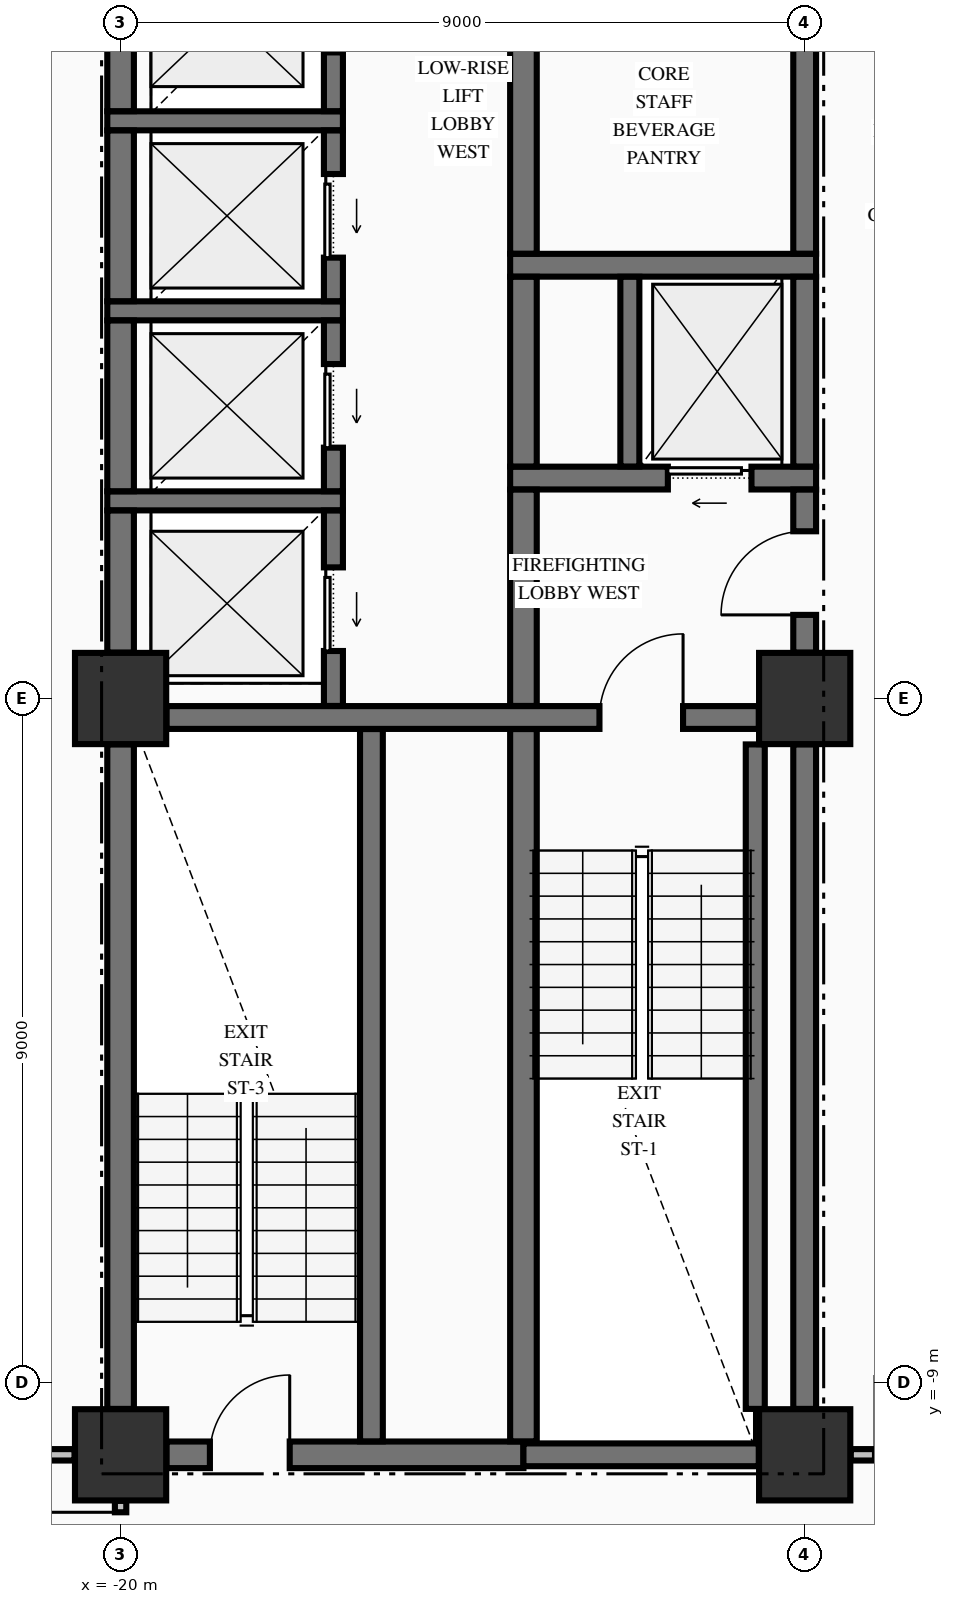
"""IFC4 building model, lengths in metres.
Left out: names, types, materials, properties, quantities, classifications, styles, units other than length and angle.
Written with IfcOpenShell. Run it as: python <this file> out.ifc"""

import sys

from ifc_helpers import new_model, si_unit, direction, frame, frame_2d, origin, origin_2d, place, context, subcontext, project, spatial, rectangle, extrude, element, fill, save


model = new_model("IFC4")
c1 = context("Model", 3, precision=1e-05, world=origin(), true_north=direction((0.0, 1.0)))
c2 = subcontext(c1, "Body", "Model", "MODEL_VIEW")
j1 = project(units=[si_unit("LENGTHUNIT", "METRE"), si_unit("PLANEANGLEUNIT", "RADIAN")], contexts=[c1])
p1 = place(None, origin())
s1 = spatial("IfcSite", under=j1, at=p1, CompositionType="ELEMENT")
p2 = place(p1, origin())
s2 = spatial("IfcBuilding", under=s1, at=p2, CompositionType="ELEMENT")
p3 = place(p2, frame((0.0, 0.0, 60.76)))
s3 = spatial("IfcBuildingStorey", under=s2, at=p3, CompositionType="ELEMENT", Elevation=60.76)
for number, where, z_axis, x_axis in (
    (1, (-20.0, -9.95, -0.3), (0.0, 0.0, 1.0), (1.0, 0.0, 0.0)),
    (2, (-11.0, -9.95, -0.3), (0.0, 0.0, 1.0), (1.0, 0.0, 0.0)),
    (3, (-11.0, 0.0, -0.3), (0.0, 0.0, 1.0), (1.0, 0.0, 0.0)),
    (4, (-20.0, 0.0, -0.3), (0.0, 0.0, 1.0), (1.0, 0.0, 0.0)),
):
    element("IfcColumn", number, at=place(p3, frame(where, z_axis=z_axis, x_axis=x_axis)), inside=s3, PredefinedType="COLUMN", context=c2, shape_type="SweptSolid", body=[
        extrude(rectangle(XDim=1.2, YDim=1.2, at=origin_2d()), origin(), (0.0, 0.0, 1.0), 3.62),
    ])
p4 = place(p3, frame((-19.396, -9.95, 0.0), z_axis=(0.0, 0.0, 1.0), x_axis=(1.0, 0.0, 0.0)))
e5 = element("IfcWall", 5, at=p4, inside=s3, PredefinedType="SHEAR", context=c2, shape_type="SweptSolid", body=[
    extrude(rectangle(XDim=4.696, YDim=0.35, at=frame_2d((2.348, 0.0))), origin(), (0.0, 0.0, 1.0), 3.32),
])
p5 = place(p4, frame((0.571, 0.0, 0.0)))
e6 = element("IfcOpeningElement", 6, at=p5, cuts=e5, PredefinedType="OPENING", context=c2, shape_type="SweptSolid", body=[
    extrude(rectangle(XDim=1.05, YDim=2.15, at=frame_2d((0.525, 1.075))), frame((0.0, 0.185, 0.0), z_axis=(0.0, -1.0, 0.0), x_axis=(1.0, 0.0, 0.0)), (0.0, 0.0, 1.0), 0.37),
])
p6 = place(p3, frame((-14.7, -9.95, 0.0), z_axis=(0.0, 0.0, 1.0), x_axis=(1.0, 0.0, 0.0)))
e7 = element("IfcWall", 7, at=p6, inside=s3, PredefinedType="SHEAR", context=c2, shape_type="SweptSolid", body=[
    extrude(rectangle(XDim=3.096, YDim=0.3, at=frame_2d((1.548, 0.0))), origin(), (0.0, 0.0, 1.0), 3.32),
])
p7 = place(p3, frame((-19.396, -0.25, 0.0), z_axis=(0.0, 0.0, 1.0), x_axis=(1.0, 0.0, 0.0)))
e8 = element("IfcWall", 8, at=p7, inside=s3, PredefinedType="SHEAR", context=c2, shape_type="SweptSolid", body=[
    extrude(rectangle(XDim=7.792, YDim=0.3, at=frame_2d((3.896, 0.0))), origin(), (0.0, 0.0, 1.0), 3.32),
])
p8 = place(p7, frame((5.696, 0.0, 0.0)))
e9 = element("IfcOpeningElement", 9, at=p8, cuts=e8, PredefinedType="OPENING", context=c2, shape_type="SweptSolid", body=[
    extrude(rectangle(XDim=1.1, YDim=2.15, at=frame_2d((0.55, 1.075))), frame((0.0, 0.16, 0.0), z_axis=(0.0, -1.0, 0.0), x_axis=(1.0, 0.0, 0.0)), (0.0, 0.0, 1.0), 0.32),
])
p9 = place(p3, frame((-20.175, 2.6, 0.0), z_axis=(0.0, 0.0, 1.0), x_axis=(1.0, 0.0, 0.0)))
e10 = element("IfcWall", 10, at=p9, inside=s3, PredefinedType="SOLIDWALL", context=c2, shape_type="SweptSolid", body=[
    extrude(rectangle(XDim=3.1, YDim=0.25, at=frame_2d((1.55, 0.0))), origin(), (0.0, 0.0, 1.0), 3.32),
])
p10 = place(p3, frame((-14.875, 2.9, 0.0), z_axis=(0.0, 0.0, 1.0), x_axis=(1.0, 0.0, 0.0)))
e11 = element("IfcWall", 11, at=p10, inside=s3, PredefinedType="SHEAR", context=c2, shape_type="SweptSolid", body=[
    extrude(rectangle(XDim=4.025, YDim=0.3, at=frame_2d((2.012, 0.0))), origin(), (0.0, 0.0, 1.0), 3.32),
])
p11 = place(p10, frame((2.075, 0.0, 0.0)))
e12 = element("IfcOpeningElement", 12, at=p11, cuts=e11, PredefinedType="OPENING", context=c2, shape_type="SweptSolid", body=[
    extrude(rectangle(XDim=1.1, YDim=2.2, at=frame_2d((0.55, 1.1))), frame((0.0, 0.16, 0.0), z_axis=(0.0, -1.0, 0.0), x_axis=(1.0, 0.0, 0.0)), (0.0, 0.0, 1.0), 0.32),
])
p12 = place(p3, frame((-20.175, 5.1, 0.0), z_axis=(0.0, 0.0, 1.0), x_axis=(1.0, 0.0, 0.0)))
e13 = element("IfcWall", 13, at=p12, inside=s3, PredefinedType="SOLIDWALL", context=c2, shape_type="SweptSolid", body=[
    extrude(rectangle(XDim=3.1, YDim=0.25, at=frame_2d((1.55, 0.0))), origin(), (0.0, 0.0, 1.0), 3.32),
])
p13 = place(p3, frame((-14.875, 5.7, 0.0), z_axis=(0.0, 0.0, 1.0), x_axis=(1.0, 0.0, 0.0)))
e14 = element("IfcWall", 14, at=p13, inside=s3, PredefinedType="SHEAR", context=c2, shape_type="SweptSolid", body=[
    extrude(rectangle(XDim=4.025, YDim=0.3, at=frame_2d((2.012, 0.0))), origin(), (0.0, 0.0, 1.0), 3.32),
])
p14 = place(p3, frame((-20.175, 7.6, 0.0), z_axis=(0.0, 0.0, 1.0), x_axis=(1.0, 0.0, 0.0)))
e15 = element("IfcWall", 15, at=p14, inside=s3, PredefinedType="SOLIDWALL", context=c2, shape_type="SweptSolid", body=[
    extrude(rectangle(XDim=3.1, YDim=0.25, at=frame_2d((1.55, 0.0))), origin(), (0.0, 0.0, 1.0), 3.32),
])
p15 = place(p3, frame((-28.835, -9.95, 0.0), z_axis=(0.0, 0.0, 1.0), x_axis=(1.0, 0.0, 0.0)))
e16 = element("IfcWall", 16, at=p15, inside=s3, PredefinedType="PARTITIONING", context=c2, shape_type="SweptSolid", body=[
    extrude(rectangle(XDim=8.229, YDim=0.15, at=frame_2d((4.115, 0.0))), origin(), (0.0, 0.0, 1.0), 3.32),
])
p16 = place(p15, frame((3.835, 0.0, 0.0)))
e17 = element("IfcOpeningElement", 17, at=p16, cuts=e16, PredefinedType="OPENING", context=c2, shape_type="SweptSolid", body=[
    extrude(rectangle(XDim=1.0, YDim=2.15, at=frame_2d((0.5, 1.075))), frame((0.0, 0.085, 0.0), z_axis=(0.0, -1.0, 0.0), x_axis=(1.0, 0.0, 0.0)), (0.0, 0.0, 1.0), 0.17),
])
p17 = place(p3, frame((-10.394, -9.95, 0.0), z_axis=(0.0, 0.0, 1.0), x_axis=(1.0, 0.0, 0.0)))
e18 = element("IfcWall", 18, at=p17, inside=s3, PredefinedType="PARTITIONING", context=c2, shape_type="SweptSolid", body=[
    extrude(rectangle(XDim=20.788, YDim=0.15, at=frame_2d((10.394, 0.0))), origin(), (0.0, 0.0, 1.0), 3.32),
])
p18 = place(p17, frame((0.319, 0.0, 0.0)))
e19 = element("IfcOpeningElement", 19, at=p18, cuts=e18, PredefinedType="OPENING", context=c2, shape_type="SweptSolid", body=[
    extrude(rectangle(XDim=1.05, YDim=2.15, at=frame_2d((0.525, 1.075))), frame((0.0, 0.085, 0.0), z_axis=(0.0, -1.0, 0.0), x_axis=(1.0, 0.0, 0.0)), (0.0, 0.0, 1.0), 0.17),
])
p19 = place(p17, frame((19.419, 0.0, 0.0)))
e20 = element("IfcOpeningElement", 20, at=p19, cuts=e18, PredefinedType="OPENING", context=c2, shape_type="SweptSolid", body=[
    extrude(rectangle(XDim=1.05, YDim=2.15, at=frame_2d((0.525, 1.075))), frame((0.0, 0.085, 0.0), z_axis=(0.0, -1.0, 0.0), x_axis=(1.0, 0.0, 0.0)), (0.0, 0.0, 1.0), 0.17),
])
p20 = place(p17, frame((13.369, 0.0, 0.0)))
e21 = element("IfcOpeningElement", 21, at=p20, cuts=e18, PredefinedType="OPENING", context=c2, shape_type="SweptSolid", body=[
    extrude(rectangle(XDim=0.95, YDim=2.15, at=frame_2d((0.475, 1.075))), frame((0.0, 0.085, 0.0), z_axis=(0.0, -1.0, 0.0), x_axis=(1.0, 0.0, 0.0)), (0.0, 0.0, 1.0), 0.17),
])
p21 = place(p3, frame((-20.0, -9.346, 0.0), z_axis=(0.0, 0.0, 1.0), x_axis=(0.0, 1.0, 0.0)))
e22 = element("IfcWall", 22, at=p21, inside=s3, PredefinedType="SHEAR", context=c2, shape_type="SweptSolid", body=[
    extrude(rectangle(XDim=8.742, YDim=0.35, at=frame_2d((4.371, 0.0))), origin(), (0.0, 0.0, 1.0), 3.32),
])
p22 = place(p3, frame((-20.0, 0.604, 0.0), z_axis=(0.0, 0.0, 1.0), x_axis=(0.0, 1.0, 0.0)))
e23 = element("IfcWall", 23, at=p22, inside=s3, PredefinedType="SHEAR", context=c2, shape_type="SweptSolid", body=[
    extrude(rectangle(XDim=1.869, YDim=0.35, at=frame_2d((0.935, 0.0))), origin(), (0.0, 0.0, 1.0), 3.32),
])
for number, where, z_axis, x_axis in (
    (24, (-20.0, 2.727, 0.0), (0.0, 0.0, 1.0), (0.0, 1.0, 0.0)),
    (25, (-20.0, 5.227, 0.0), (0.0, 0.0, 1.0), (0.0, 1.0, 0.0)),
):
    element("IfcWall", number, at=place(p3, frame(where, z_axis=z_axis, x_axis=x_axis)), inside=s3, PredefinedType="SHEAR", context=c2, shape_type="SweptSolid", body=[
        extrude(rectangle(XDim=2.246, YDim=0.35, at=frame_2d((1.123, 0.0))), origin(), (0.0, 0.0, 1.0), 3.32),
    ])
p23 = place(p3, frame((-20.0, 7.727, 0.0), z_axis=(0.0, 0.0, 1.0), x_axis=(0.0, 1.0, 0.0)))
e26 = element("IfcWall", 26, at=p23, inside=s3, PredefinedType="SHEAR", context=c2, shape_type="SweptSolid", body=[
    extrude(rectangle(XDim=2.169, YDim=0.35, at=frame_2d((1.084, 0.0))), origin(), (0.0, 0.0, 1.0), 3.32),
])
p24 = place(p3, frame((-17.2, -0.098, 0.0), z_axis=(0.0, 0.0, 1.0), x_axis=(0.0, 1.0, 0.0)))
e27 = element("IfcWall", 27, at=p24, inside=s3, PredefinedType="SOLIDWALL", context=c2, shape_type="SweptSolid", body=[
    extrude(rectangle(XDim=2.571, YDim=0.25, at=frame_2d((1.285, 0.0))), origin(), (0.0, 0.0, 1.0), 3.32),
])
p25 = place(p24, frame((0.723, 0.0, 0.0)))
e28 = element("IfcOpeningElement", 28, at=p25, cuts=e27, PredefinedType="OPENING", context=c2, shape_type="SweptSolid", body=[
    extrude(rectangle(XDim=1.1, YDim=2.2, at=frame_2d((0.55, 1.1))), frame((0.0, 0.135, 0.0), z_axis=(0.0, -1.0, 0.0), x_axis=(1.0, 0.0, 0.0)), (0.0, 0.0, 1.0), 0.27),
])
p26 = place(p3, frame((-17.2, 2.727, 0.0), z_axis=(0.0, 0.0, 1.0), x_axis=(0.0, 1.0, 0.0)))
e29 = element("IfcWall", 29, at=p26, inside=s3, PredefinedType="SOLIDWALL", context=c2, shape_type="SweptSolid", body=[
    extrude(rectangle(XDim=2.246, YDim=0.25, at=frame_2d((1.123, 0.0))), origin(), (0.0, 0.0, 1.0), 3.32),
])
p27 = place(p26, frame((0.573, 0.0, 0.0)))
e30 = element("IfcOpeningElement", 30, at=p27, cuts=e29, PredefinedType="OPENING", context=c2, shape_type="SweptSolid", body=[
    extrude(rectangle(XDim=1.1, YDim=2.2, at=frame_2d((0.55, 1.1))), frame((0.0, 0.135, 0.0), z_axis=(0.0, -1.0, 0.0), x_axis=(1.0, 0.0, 0.0)), (0.0, 0.0, 1.0), 0.27),
])
p28 = place(p3, frame((-17.2, 5.227, 0.0), z_axis=(0.0, 0.0, 1.0), x_axis=(0.0, 1.0, 0.0)))
e31 = element("IfcWall", 31, at=p28, inside=s3, PredefinedType="SOLIDWALL", context=c2, shape_type="SweptSolid", body=[
    extrude(rectangle(XDim=2.246, YDim=0.25, at=frame_2d((1.123, 0.0))), origin(), (0.0, 0.0, 1.0), 3.32),
])
p29 = place(p28, frame((0.573, 0.0, 0.0)))
e32 = element("IfcOpeningElement", 32, at=p29, cuts=e31, PredefinedType="OPENING", context=c2, shape_type="SweptSolid", body=[
    extrude(rectangle(XDim=1.1, YDim=2.2, at=frame_2d((0.55, 1.1))), frame((0.0, 0.135, 0.0), z_axis=(0.0, -1.0, 0.0), x_axis=(1.0, 0.0, 0.0)), (0.0, 0.0, 1.0), 0.27),
])
p30 = place(p3, frame((-17.2, 7.727, 0.0), z_axis=(0.0, 0.0, 1.0), x_axis=(0.0, 1.0, 0.0)))
e33 = element("IfcWall", 33, at=p30, inside=s3, PredefinedType="SOLIDWALL", context=c2, shape_type="SweptSolid", body=[
    extrude(rectangle(XDim=2.596, YDim=0.25, at=frame_2d((1.298, 0.0))), origin(), (0.0, 0.0, 1.0), 3.32),
])
p31 = place(p30, frame((0.773, 0.0, 0.0)))
e34 = element("IfcOpeningElement", 34, at=p31, cuts=e33, PredefinedType="OPENING", context=c2, shape_type="SweptSolid", body=[
    extrude(rectangle(XDim=1.1, YDim=2.2, at=frame_2d((0.55, 1.1))), frame((0.0, 0.135, 0.0), z_axis=(0.0, -1.0, 0.0), x_axis=(1.0, 0.0, 0.0)), (0.0, 0.0, 1.0), 0.27),
])
p32 = place(p3, frame((-16.7, -9.773, 0.0), z_axis=(0.0, 0.0, 1.0), x_axis=(0.0, 1.0, 0.0)))
e35 = element("IfcWall", 35, at=p32, inside=s3, PredefinedType="SHEAR", context=c2, shape_type="SweptSolid", body=[
    extrude(rectangle(XDim=9.371, YDim=0.3, at=frame_2d((4.686, 0.0))), origin(), (0.0, 0.0, 1.0), 3.32),
])
p33 = place(p3, frame((-14.7, -9.773, 0.0), z_axis=(0.0, 0.0, 1.0), x_axis=(0.0, 1.0, 0.0)))
e36 = element("IfcWall", 36, at=p33, inside=s3, PredefinedType="SHEAR", context=c2, shape_type="SweptSolid", body=[
    extrude(rectangle(XDim=9.371, YDim=0.35, at=frame_2d((4.686, 0.0))), origin(), (0.0, 0.0, 1.0), 3.32),
])
p34 = place(p3, frame((-14.7, -0.098, 0.0), z_axis=(0.0, 0.0, 1.0), x_axis=(0.0, 1.0, 0.0)))
e37 = element("IfcWall", 37, at=p34, inside=s3, PredefinedType="SHEAR", context=c2, shape_type="SweptSolid", body=[
    extrude(rectangle(XDim=2.846, YDim=0.35, at=frame_2d((1.423, 0.0))), origin(), (0.0, 0.0, 1.0), 3.32),
])
p35 = place(p3, frame((-14.7, 3.052, 0.0), z_axis=(0.0, 0.0, 1.0), x_axis=(0.0, 1.0, 0.0)))
e38 = element("IfcWall", 38, at=p35, inside=s3, PredefinedType="SHEAR", context=c2, shape_type="SweptSolid", body=[
    extrude(rectangle(XDim=2.496, YDim=0.35, at=frame_2d((1.248, 0.0))), origin(), (0.0, 0.0, 1.0), 3.32),
])
p36 = place(p3, frame((-14.7, 5.852, 0.0), z_axis=(0.0, 0.0, 1.0), x_axis=(0.0, 1.0, 0.0)))
e39 = element("IfcWall", 39, at=p36, inside=s3, PredefinedType="SHEAR", context=c2, shape_type="SweptSolid", body=[
    extrude(rectangle(XDim=4.471, YDim=0.35, at=frame_2d((2.235, 0.0))), origin(), (0.0, 0.0, 1.0), 3.32),
])
p37 = place(p3, frame((-13.3, 3.052, 0.0), z_axis=(0.0, 0.0, 1.0), x_axis=(0.0, 1.0, 0.0)))
e40 = element("IfcWall", 40, at=p37, inside=s3, PredefinedType="SOLIDWALL", context=c2, shape_type="SweptSolid", body=[
    extrude(rectangle(XDim=2.496, YDim=0.25, at=frame_2d((1.248, 0.0))), origin(), (0.0, 0.0, 1.0), 3.32),
])
p38 = place(p3, frame((-11.65, -9.346, 0.0), z_axis=(0.0, 0.0, 1.0), x_axis=(0.0, 1.0, 0.0)))
e41 = element("IfcWall", 41, at=p38, inside=s3, PredefinedType="SOLIDWALL", context=c2, shape_type="SweptSolid", body=[
    extrude(rectangle(XDim=8.742, YDim=0.25, at=frame_2d((4.371, 0.0))), origin(), (0.0, 0.0, 1.0), 3.32),
])
p39 = place(p3, frame((-11.0, -9.346, 0.0), z_axis=(0.0, 0.0, 1.0), x_axis=(0.0, 1.0, 0.0)))
e42 = element("IfcWall", 42, at=p39, inside=s3, PredefinedType="SHEAR", context=c2, shape_type="SweptSolid", body=[
    extrude(rectangle(XDim=8.742, YDim=0.3, at=frame_2d((4.371, 0.0))), origin(), (0.0, 0.0, 1.0), 3.32),
])
p40 = place(p3, frame((-11.0, 0.604, 0.0), z_axis=(0.0, 0.0, 1.0), x_axis=(0.0, 1.0, 0.0)))
e43 = element("IfcWall", 43, at=p40, inside=s3, PredefinedType="SHEAR", context=c2, shape_type="SweptSolid", body=[
    extrude(rectangle(XDim=2.144, YDim=0.3, at=frame_2d((1.072, 0.0))), origin(), (0.0, 0.0, 1.0), 3.32),
])
p41 = place(p40, frame((0.496, 0.0, 0.0)))
e44 = element("IfcOpeningElement", 44, at=p41, cuts=e43, PredefinedType="OPENING", context=c2, shape_type="SweptSolid", body=[
    extrude(rectangle(XDim=1.1, YDim=2.15, at=frame_2d((0.55, 1.075))), frame((0.0, 0.16, 0.0), z_axis=(0.0, -1.0, 0.0), x_axis=(1.0, 0.0, 0.0)), (0.0, 0.0, 1.0), 0.32),
])
p42 = place(p3, frame((-11.0, 3.052, 0.0), z_axis=(0.0, 0.0, 1.0), x_axis=(0.0, 1.0, 0.0)))
e45 = element("IfcWall", 45, at=p42, inside=s3, PredefinedType="SHEAR", context=c2, shape_type="SweptSolid", body=[
    extrude(rectangle(XDim=2.496, YDim=0.3, at=frame_2d((1.248, 0.0))), origin(), (0.0, 0.0, 1.0), 3.32),
])
p43 = place(p3, frame((-11.0, 5.852, 0.0), z_axis=(0.0, 0.0, 1.0), x_axis=(0.0, 1.0, 0.0)))
e46 = element("IfcWall", 46, at=p43, inside=s3, PredefinedType="SHEAR", context=c2, shape_type="SweptSolid", body=[
    extrude(rectangle(XDim=4.044, YDim=0.3, at=frame_2d((2.022, 0.0))), origin(), (0.0, 0.0, 1.0), 3.32),
])
p44 = place(p3, frame((-20.0, -12.122, 0.0), z_axis=(0.0, 0.0, 1.0), x_axis=(0.0, 1.0, 0.0)))
e47 = element("IfcWall", 47, at=p44, inside=s3, PredefinedType="PARTITIONING", context=c2, shape_type="SweptSolid", body=[
    extrude(rectangle(XDim=1.566, YDim=0.15, at=frame_2d((0.783, 0.0))), origin(), (0.0, 0.0, 1.0), 2.66),
])
p45 = place(p44, frame((0.466, 0.0, 0.0)))
e48 = element("IfcOpeningElement", 48, at=p45, cuts=e47, PredefinedType="OPENING", context=c2, shape_type="SweptSolid", body=[
    extrude(rectangle(XDim=0.95, YDim=2.15, at=frame_2d((0.475, 1.075))), frame((0.0, 0.085, 0.0), z_axis=(0.0, -1.0, 0.0), x_axis=(1.0, 0.0, 0.0)), (0.0, 0.0, 1.0), 0.17),
])
p46 = place(p8, origin())
e49 = element("IfcDoor", 49, at=p46, inside=s3, OperationType="SINGLE_SWING_RIGHT", PredefinedType="DOOR", context=c2, shape_type="SweptSolid", body=[
    extrude(rectangle(XDim=1.1, YDim=2.15, at=frame_2d((0.55, 1.075))), frame((0.0, 0.025, 0.0), z_axis=(0.0, -1.0, 0.0), x_axis=(1.0, 0.0, 0.0)), (0.0, 0.0, 1.0), 0.05),
])
fill(e9, e49)
p47 = place(p41, origin())
e50 = element("IfcDoor", 50, at=p47, inside=s3, OperationType="SINGLE_SWING_LEFT", PredefinedType="DOOR", context=c2, shape_type="SweptSolid", body=[
    extrude(rectangle(XDim=1.1, YDim=2.15, at=frame_2d((0.55, 1.075))), frame((0.0, 0.025, 0.0), z_axis=(0.0, -1.0, 0.0), x_axis=(1.0, 0.0, 0.0)), (0.0, 0.0, 1.0), 0.05),
])
fill(e44, e50)
p48 = place(p11, origin())
e51 = element("IfcDoor", 51, at=p48, inside=s3, OperationType="SLIDING_TO_LEFT", PredefinedType="DOOR", context=c2, shape_type="SweptSolid", body=[
    extrude(rectangle(XDim=1.1, YDim=2.2, at=frame_2d((0.55, 1.1))), frame((0.0, 0.025, 0.0), z_axis=(0.0, -1.0, 0.0), x_axis=(1.0, 0.0, 0.0)), (0.0, 0.0, 1.0), 0.05),
])
fill(e12, e51)
p49 = place(p5, origin())
e52 = element("IfcDoor", 52, at=p49, inside=s3, OperationType="SINGLE_SWING_RIGHT", PredefinedType="DOOR", context=c2, shape_type="SweptSolid", body=[
    extrude(rectangle(XDim=1.05, YDim=2.15, at=frame_2d((0.525, 1.075))), frame((0.0, 0.025, 0.0), z_axis=(0.0, -1.0, 0.0), x_axis=(1.0, 0.0, 0.0)), (0.0, 0.0, 1.0), 0.05),
])
fill(e6, e52)
p50 = place(p25, origin())
e53 = element("IfcDoor", 53, at=p50, inside=s3, OperationType="SLIDING_TO_LEFT", PredefinedType="DOOR", context=c2, shape_type="SweptSolid", body=[
    extrude(rectangle(XDim=1.1, YDim=2.2, at=frame_2d((0.55, 1.1))), frame((0.0, 0.025, 0.0), z_axis=(0.0, -1.0, 0.0), x_axis=(1.0, 0.0, 0.0)), (0.0, 0.0, 1.0), 0.05),
])
fill(e28, e53)
p51 = place(p27, origin())
e54 = element("IfcDoor", 54, at=p51, inside=s3, OperationType="SLIDING_TO_LEFT", PredefinedType="DOOR", context=c2, shape_type="SweptSolid", body=[
    extrude(rectangle(XDim=1.1, YDim=2.2, at=frame_2d((0.55, 1.1))), frame((0.0, 0.025, 0.0), z_axis=(0.0, -1.0, 0.0), x_axis=(1.0, 0.0, 0.0)), (0.0, 0.0, 1.0), 0.05),
])
fill(e30, e54)
p52 = place(p29, origin())
e55 = element("IfcDoor", 55, at=p52, inside=s3, OperationType="SLIDING_TO_LEFT", PredefinedType="DOOR", context=c2, shape_type="SweptSolid", body=[
    extrude(rectangle(XDim=1.1, YDim=2.2, at=frame_2d((0.55, 1.1))), frame((0.0, 0.025, 0.0), z_axis=(0.0, -1.0, 0.0), x_axis=(1.0, 0.0, 0.0)), (0.0, 0.0, 1.0), 0.05),
])
fill(e32, e55)
p53 = place(p45, origin())
e56 = element("IfcDoor", 56, at=p53, inside=s3, OperationType="SINGLE_SWING_RIGHT", PredefinedType="DOOR", context=c2, shape_type="SweptSolid", body=[
    extrude(rectangle(XDim=0.95, YDim=2.15, at=frame_2d((0.475, 1.075))), frame((0.0, 0.025, 0.0), z_axis=(0.0, -1.0, 0.0), x_axis=(1.0, 0.0, 0.0)), (0.0, 0.0, 1.0), 0.05),
])
fill(e48, e56)
save(model, sys.argv[1])
